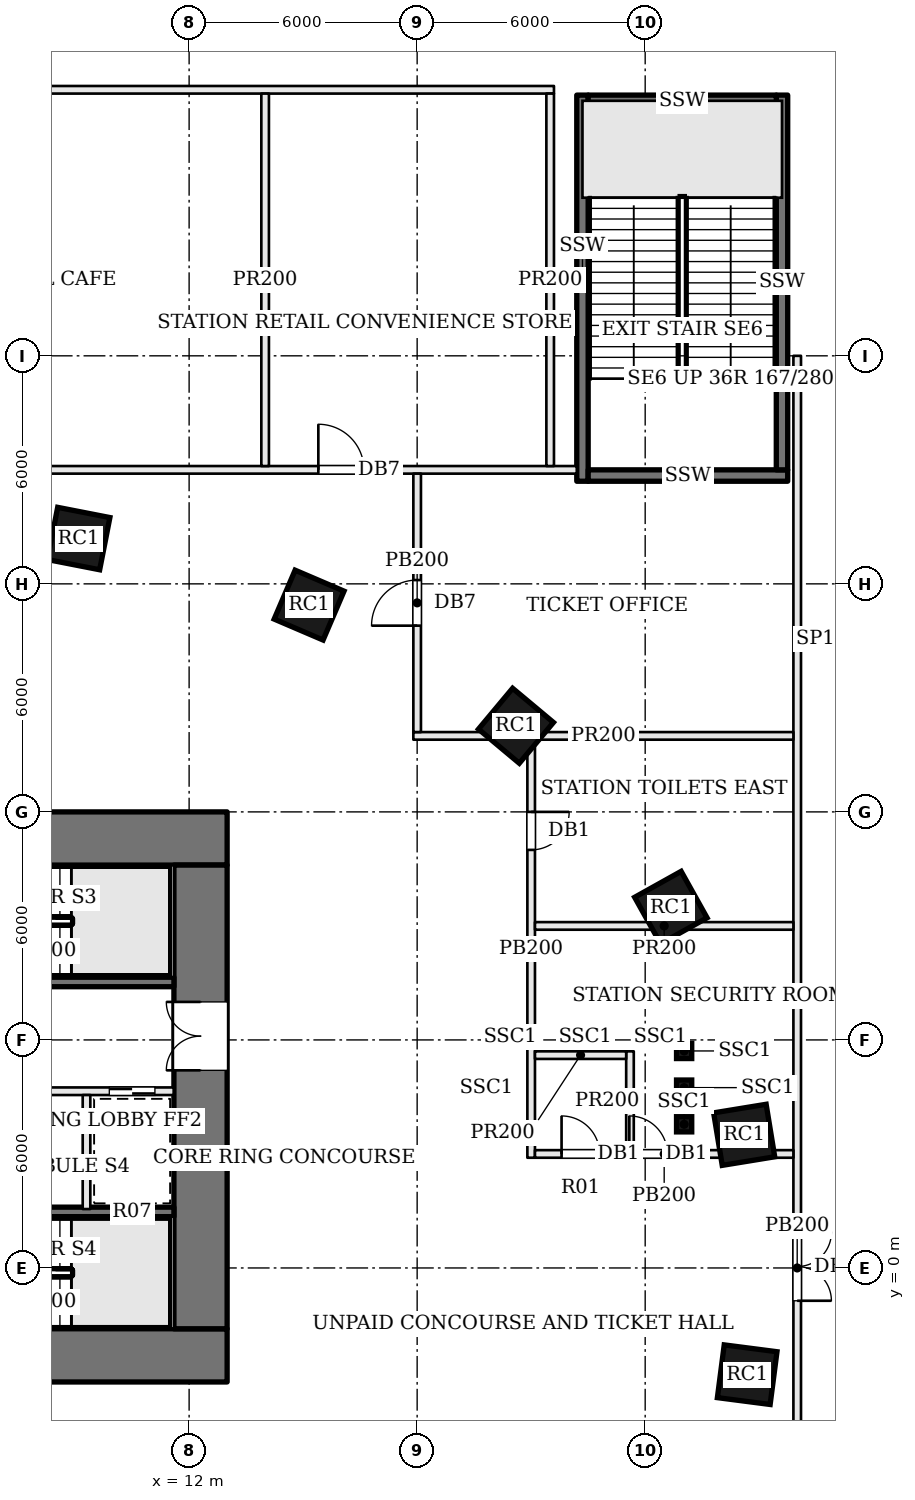
"""IFC4 building model, lengths in metres.
Left out: names, types, materials, properties, quantities, classifications, styles, units other than length and angle.
Written with IfcOpenShell. Run it as: python <this file> out.ifc"""

import sys

from ifc_helpers import new_model, si_unit, direction, frame, frame_2d, origin, origin_2d, place, context, subcontext, project, spatial, rectangle, extrude, element, fill, save


model = new_model("IFC4")
c1 = context("Model", 3, precision=1e-05, world=origin(), true_north=direction((0.0, 1.0)))
c2 = subcontext(c1, "Body", "Model", "MODEL_VIEW")
j1 = project(units=[si_unit("LENGTHUNIT", "METRE"), si_unit("PLANEANGLEUNIT", "RADIAN")], contexts=[c1])
p1 = place(None, origin())
s1 = spatial("IfcSite", under=j1, at=p1, CompositionType="ELEMENT")
p2 = place(p1, origin())
s2 = spatial("IfcBuilding", under=s1, at=p2, CompositionType="ELEMENT")
p3 = place(p2, frame((0.0, 0.0, -6.0)))
s3 = spatial("IfcBuildingStorey", under=s2, at=p3, CompositionType="ELEMENT", Elevation=-6.0)
p4 = place(p3, frame((-13.0, 11.3, 0.0), z_axis=(0.0, 0.0, 1.0), x_axis=(1.0, 0.0, 0.0)))
e1 = element("IfcWall", 1, at=p4, inside=s3, PredefinedType="SHEAR", context=c2, shape_type="SweptSolid", body=[
    extrude(rectangle(XDim=26.0, YDim=1.4, at=frame_2d((13.0, 0.0))), origin(), (0.0, 0.0, 1.0), 6.0),
])
p5 = place(p4, frame((9.375, 0.0, 0.0)))
e2 = element("IfcOpeningElement", 2, at=p5, cuts=e1, PredefinedType="OPENING", context=c2, shape_type="SweptSolid", body=[
    extrude(rectangle(XDim=0.7, YDim=2.1, at=frame_2d((0.35, 1.05))), frame((0.0, 0.71, 0.0), z_axis=(0.0, -1.0, 0.0), x_axis=(1.0, 0.0, 0.0)), (0.0, 0.0, 1.0), 1.42),
])
p6 = place(p4, frame((12.625, 0.0, 0.0)))
e3 = element("IfcOpeningElement", 3, at=p6, cuts=e1, PredefinedType="OPENING", context=c2, shape_type="SweptSolid", body=[
    extrude(rectangle(XDim=0.7, YDim=2.1, at=frame_2d((0.35, 1.05))), frame((0.0, 0.71, 0.0), z_axis=(0.0, -1.0, 0.0), x_axis=(1.0, 0.0, 0.0)), (0.0, 0.0, 1.0), 1.42),
])
p7 = place(p4, frame((14.8, 0.0, 0.0)))
e4 = element("IfcOpeningElement", 4, at=p7, cuts=e1, PredefinedType="OPENING", context=c2, shape_type="SweptSolid", body=[
    extrude(rectangle(XDim=1.0, YDim=2.1, at=frame_2d((0.5, 1.05))), frame((0.0, 0.71, 0.0), z_axis=(0.0, -1.0, 0.0), x_axis=(1.0, 0.0, 0.0)), (0.0, 0.0, 1.0), 1.42),
])
p8 = place(p3, frame((-13.0, -2.3, 0.0), z_axis=(0.0, 0.0, 1.0), x_axis=(1.0, 0.0, 0.0)))
e5 = element("IfcWall", 5, at=p8, inside=s3, PredefinedType="SHEAR", context=c2, shape_type="SweptSolid", body=[
    extrude(rectangle(XDim=26.0, YDim=1.4, at=frame_2d((13.0, 0.0))), origin(), (0.0, 0.0, 1.0), 6.0),
])
p9 = place(p8, frame((9.125, 0.0, 0.0)))
e6 = element("IfcOpeningElement", 6, at=p9, cuts=e5, PredefinedType="OPENING", context=c2, shape_type="SweptSolid", body=[
    extrude(rectangle(XDim=1.2, YDim=2.1, at=frame_2d((0.6, 1.05))), frame((0.0, 0.71, 0.0), z_axis=(0.0, -1.0, 0.0), x_axis=(1.0, 0.0, 0.0)), (0.0, 0.0, 1.0), 1.42),
])
p10 = place(p8, frame((12.625, 0.0, 0.0)))
e7 = element("IfcOpeningElement", 7, at=p10, cuts=e5, PredefinedType="OPENING", context=c2, shape_type="SweptSolid", body=[
    extrude(rectangle(XDim=0.7, YDim=2.1, at=frame_2d((0.35, 1.05))), frame((0.0, 0.71, 0.0), z_axis=(0.0, -1.0, 0.0), x_axis=(1.0, 0.0, 0.0)), (0.0, 0.0, 1.0), 1.42),
])
p11 = place(p8, frame((15.75, 0.0, 0.0)))
e8 = element("IfcOpeningElement", 8, at=p11, cuts=e5, PredefinedType="OPENING", context=c2, shape_type="SweptSolid", body=[
    extrude(rectangle(XDim=1.0, YDim=2.1, at=frame_2d((0.5, 1.05))), frame((0.0, 0.71, 0.0), z_axis=(0.0, -1.0, 0.0), x_axis=(1.0, 0.0, 0.0)), (0.0, 0.0, 1.0), 1.42),
])
p12 = place(p3, frame((12.3, -1.6, 0.0), z_axis=(0.0, 0.0, 1.0), x_axis=(0.0, 1.0, 0.0)))
e9 = element("IfcWall", 9, at=p12, inside=s3, PredefinedType="SHEAR", context=c2, shape_type="SweptSolid", body=[
    extrude(rectangle(XDim=12.2, YDim=1.4, at=frame_2d((6.1, 0.0))), origin(), (0.0, 0.0, 1.0), 6.0),
])
p13 = place(p12, frame((6.8, 0.0, 0.0)))
e10 = element("IfcOpeningElement", 10, at=p13, cuts=e9, PredefinedType="OPENING", context=c2, shape_type="SweptSolid", body=[
    extrude(rectangle(XDim=1.8, YDim=2.1, at=frame_2d((0.9, 1.05))), frame((0.0, 0.71, 0.0), z_axis=(0.0, -1.0, 0.0), x_axis=(1.0, 0.0, 0.0)), (0.0, 0.0, 1.0), 1.42),
])
for number, where, z_axis, x_axis in (
    (11, (26.605, 3.503, 0.0), (0.0, 0.0, 1.0), (-0.161, 0.987, 0.0)),
    (12, (24.676, 9.483, 0.0), (0.0, 0.0, 1.0), (-0.487, 0.873, 0.0)),
    (13, (20.6, 14.266, 0.0), (0.0, 0.0, 1.0), (-0.767, 0.641, 0.0)),
    (14, (15.157, 17.441, 0.0), (0.0, 0.0, 1.0), (-0.919, 0.394, 0.0)),
    (15, (9.094, 19.192, 0.0), (0.0, 0.0, 1.0), (-0.981, 0.192, 0.0)),
    (16, (26.684, -2.808, 0.0), (0.0, 0.0, 1.0), (0.128, 0.992, 0.0)),
):
    element("IfcColumn", number, at=place(p3, frame(where, z_axis=z_axis, x_axis=x_axis)), inside=s3, PredefinedType="COLUMN", context=c2, shape_type="SweptSolid", body=[
        extrude(rectangle(XDim=1.4, YDim=1.4, at=origin_2d()), origin(), (0.0, 0.0, 1.0), 6.0),
    ])
p14 = place(p3, frame((11.6, 7.525, 0.0), z_axis=(0.0, 0.0, 1.0), x_axis=(-1.0, 0.0, 0.0)))
e17 = element("IfcWall", 17, at=p14, inside=s3, PredefinedType="SOLIDWALL", context=c2, shape_type="SweptSolid", body=[
    extrude(rectangle(XDim=6.5, YDim=0.25, at=frame_2d((3.25, 0.0))), origin(), (0.0, 0.0, 1.0), 5.65),
])
p15 = place(p14, frame((5.2, 0.0, 0.0)))
e18 = element("IfcOpeningElement", 18, at=p15, cuts=e17, PredefinedType="OPENING", context=c2, shape_type="SweptSolid", body=[
    extrude(rectangle(XDim=1.2, YDim=2.1, at=frame_2d((0.6, 1.05))), frame((0.0, 0.135, 0.0), z_axis=(0.0, -1.0, 0.0), x_axis=(1.0, 0.0, 0.0)), (0.0, 0.0, 1.0), 0.27),
])
p16 = place(p3, frame((11.6, 4.65, 0.0), z_axis=(0.0, 0.0, 1.0), x_axis=(-1.0, 0.0, 0.0)))
e19 = element("IfcWall", 19, at=p16, inside=s3, PredefinedType="SOLIDWALL", context=c2, shape_type="SweptSolid", body=[
    extrude(rectangle(XDim=6.5, YDim=0.2, at=frame_2d((3.25, 0.0))), origin(), (0.0, 0.0, 1.0), 5.65),
])
p17 = place(p16, frame((3.8, 0.0, 0.0)))
e20 = element("IfcOpeningElement", 20, at=p17, cuts=e19, PredefinedType="OPENING", context=c2, shape_type="SweptSolid", body=[
    extrude(rectangle(XDim=1.2, YDim=2.1, at=frame_2d((0.6, 1.05))), frame((0.0, 0.11, 0.0), z_axis=(0.0, -1.0, 0.0), x_axis=(1.0, 0.0, 0.0)), (0.0, 0.0, 1.0), 0.22),
])
p18 = place(p16, frame((0.5, 0.0, 0.0)))
e21 = element("IfcOpeningElement", 21, at=p18, cuts=e19, PredefinedType="OPENING", context=c2, shape_type="SweptSolid", body=[
    extrude(rectangle(XDim=1.2, YDim=2.1, at=frame_2d((0.6, 1.05))), frame((0.0, 0.11, 0.0), z_axis=(0.0, -1.0, 0.0), x_axis=(1.0, 0.0, 0.0)), (0.0, 0.0, 1.0), 0.22),
])
p19 = place(p3, frame((11.6, 1.475, 0.0), z_axis=(0.0, 0.0, 1.0), x_axis=(-1.0, 0.0, 0.0)))
e22 = element("IfcWall", 22, at=p19, inside=s3, PredefinedType="SOLIDWALL", context=c2, shape_type="SweptSolid", body=[
    extrude(rectangle(XDim=6.5, YDim=0.25, at=frame_2d((3.25, 0.0))), origin(), (0.0, 0.0, 1.0), 5.65),
])
p20 = place(p19, frame((5.2, 0.0, 0.0)))
e23 = element("IfcOpeningElement", 23, at=p20, cuts=e22, PredefinedType="OPENING", context=c2, shape_type="SweptSolid", body=[
    extrude(rectangle(XDim=1.2, YDim=2.1, at=frame_2d((0.6, 1.05))), frame((0.0, 0.135, 0.0), z_axis=(0.0, -1.0, 0.0), x_axis=(1.0, 0.0, 0.0)), (0.0, 0.0, 1.0), 0.27),
])
p21 = place(p3, frame((9.3, 4.55, 0.0), z_axis=(0.0, 0.0, 1.0), x_axis=(0.0, -1.0, 0.0)))
e24 = element("IfcWall", 24, at=p21, inside=s3, PredefinedType="SOLIDWALL", context=c2, shape_type="SweptSolid", body=[
    extrude(rectangle(XDim=3.0, YDim=0.2, at=frame_2d((1.5, 0.0))), origin(), (0.0, 0.0, 1.0), 5.65),
])
p22 = place(p3, frame((28.0, 24.0, 0.0), z_axis=(0.0, 0.0, 1.0), x_axis=(0.0, -1.0, 0.0)))
e25 = element("IfcWall", 25, at=p22, inside=s3, PredefinedType="PARTITIONING", context=c2, shape_type="SweptSolid", body=[
    extrude(rectangle(XDim=48.0, YDim=0.2, at=frame_2d((24.0, 0.0))), origin(), (0.0, 0.0, 1.0), 5.148),
])
p23 = place(p22, frame((23.063, 0.0, 0.0)))
e26 = element("IfcOpeningElement", 26, at=p23, cuts=e25, PredefinedType="OPENING", context=c2, shape_type="SweptSolid", body=[
    extrude(rectangle(XDim=1.8, YDim=2.1, at=frame_2d((0.9, 1.05))), frame((0.0, 0.11, 0.0), z_axis=(0.0, -1.0, 0.0), x_axis=(1.0, 0.0, 0.0)), (0.0, 0.0, 1.0), 0.22),
])
p24 = place(p3, frame((27.9, 14.0, 0.0), z_axis=(0.0, 0.0, 1.0), x_axis=(-1.0, 0.0, 0.0)))
e27 = element("IfcWall", 27, at=p24, inside=s3, PredefinedType="PARTITIONING", context=c2, shape_type="SweptSolid", body=[
    extrude(rectangle(XDim=10.0, YDim=0.2, at=frame_2d((5.0, 0.0))), origin(), (0.0, 0.0, 1.0), 5.134),
])
p25 = place(p3, frame((21.0, 13.9, 0.0), z_axis=(0.0, 0.0, 1.0), x_axis=(0.0, -1.0, 0.0)))
e28 = element("IfcWall", 28, at=p25, inside=s3, PredefinedType="PARTITIONING", context=c2, shape_type="SweptSolid", body=[
    extrude(rectangle(XDim=11.0, YDim=0.2, at=frame_2d((5.5, 0.0))), origin(), (0.0, 0.0, 1.0), 5.148),
])
p26 = place(p25, frame((1.9, 0.0, 0.0)))
e29 = element("IfcOpeningElement", 29, at=p26, cuts=e28, PredefinedType="OPENING", context=c2, shape_type="SweptSolid", body=[
    extrude(rectangle(XDim=1.0, YDim=2.1, at=frame_2d((0.5, 1.05))), frame((0.0, 0.11, 0.0), z_axis=(0.0, -1.0, 0.0), x_axis=(1.0, 0.0, 0.0)), (0.0, 0.0, 1.0), 0.22),
])
p27 = place(p3, frame((21.1, 9.0, 0.0), z_axis=(0.0, 0.0, 1.0), x_axis=(1.0, 0.0, 0.0)))
e30 = element("IfcWall", 30, at=p27, inside=s3, PredefinedType="PARTITIONING", context=c2, shape_type="SweptSolid", body=[
    extrude(rectangle(XDim=6.8, YDim=0.2, at=frame_2d((3.4, 0.0))), origin(), (0.0, 0.0, 1.0), 5.134),
])
p28 = place(p3, frame((-22.2, 21.0, 0.0), z_axis=(0.0, 0.0, 1.0), x_axis=(1.0, 0.0, 0.0)))
e31 = element("IfcWall", 31, at=p28, inside=s3, PredefinedType="PARTITIONING", context=c2, shape_type="SweptSolid", body=[
    extrude(rectangle(XDim=44.4, YDim=0.2, at=frame_2d((22.2, 0.0))), origin(), (0.0, 0.0, 1.0), 5.148),
])
p29 = place(p28, frame((5.6, 0.0, 0.0)))
e32 = element("IfcOpeningElement", 32, at=p29, cuts=e31, PredefinedType="OPENING", context=c2, shape_type="SweptSolid", body=[
    extrude(rectangle(XDim=1.2, YDim=2.1, at=frame_2d((0.6, 1.05))), frame((0.0, 0.11, 0.0), z_axis=(0.0, -1.0, 0.0), x_axis=(1.0, 0.0, 0.0)), (0.0, 0.0, 1.0), 0.22),
])
p30 = place(p28, frame((14.6, 0.0, 0.0)))
e33 = element("IfcOpeningElement", 33, at=p30, cuts=e31, PredefinedType="OPENING", context=c2, shape_type="SweptSolid", body=[
    extrude(rectangle(XDim=1.2, YDim=2.1, at=frame_2d((0.6, 1.05))), frame((0.0, 0.11, 0.0), z_axis=(0.0, -1.0, 0.0), x_axis=(1.0, 0.0, 0.0)), (0.0, 0.0, 1.0), 0.22),
])
p31 = place(p28, frame((28.259, 0.0, 0.0)))
e34 = element("IfcOpeningElement", 34, at=p31, cuts=e31, PredefinedType="OPENING", context=c2, shape_type="SweptSolid", body=[
    extrude(rectangle(XDim=1.2, YDim=2.1, at=frame_2d((0.6, 1.05))), frame((0.0, 0.11, 0.0), z_axis=(0.0, -1.0, 0.0), x_axis=(1.0, 0.0, 0.0)), (0.0, 0.0, 1.0), 0.22),
])
p32 = place(p28, frame((37.6, 0.0, 0.0)))
e35 = element("IfcOpeningElement", 35, at=p32, cuts=e31, PredefinedType="OPENING", context=c2, shape_type="SweptSolid", body=[
    extrude(rectangle(XDim=1.2, YDim=2.1, at=frame_2d((0.6, 1.05))), frame((0.0, 0.11, 0.0), z_axis=(0.0, -1.0, 0.0), x_axis=(1.0, 0.0, 0.0)), (0.0, 0.0, 1.0), 0.22),
])
p33 = place(p3, frame((18.0, 14.1, 0.0), z_axis=(0.0, 0.0, 1.0), x_axis=(0.0, 1.0, 0.0)))
e36 = element("IfcWall", 36, at=p33, inside=s3, PredefinedType="PARTITIONING", context=c2, shape_type="SweptSolid", body=[
    extrude(rectangle(XDim=6.8, YDim=0.2, at=frame_2d((3.4, 0.0))), origin(), (0.0, 0.0, 1.0), 5.148),
])
p34 = place(p33, frame((2.8, 0.0, 0.0)))
e37 = element("IfcOpeningElement", 37, at=p34, cuts=e36, PredefinedType="OPENING", context=c2, shape_type="SweptSolid", body=[
    extrude(rectangle(XDim=1.2, YDim=2.1, at=frame_2d((0.6, 1.05))), frame((0.0, 0.11, 0.0), z_axis=(0.0, -1.0, 0.0), x_axis=(1.0, 0.0, 0.0)), (0.0, 0.0, 1.0), 0.22),
])
p35 = place(p3, frame((22.35, 30.86, 0.0), z_axis=(0.0, 0.0, 1.0), x_axis=(0.0, -1.0, 0.0)))
e38 = element("IfcWall", 38, at=p35, inside=s3, PredefinedType="SOLIDWALL", context=c2, shape_type="SweptSolid", body=[
    extrude(rectangle(XDim=10.16, YDim=0.3, at=frame_2d((5.08, 0.0))), origin(), (0.0, 0.0, 1.0), 5.65),
])
p36 = place(p3, frame((22.5, 20.85, 0.0), z_axis=(0.0, 0.0, 1.0), x_axis=(1.0, 0.0, 0.0)))
e39 = element("IfcWall", 39, at=p36, inside=s3, PredefinedType="SOLIDWALL", context=c2, shape_type="SweptSolid", body=[
    extrude(rectangle(XDim=5.25, YDim=0.3, at=frame_2d((2.625, 0.0))), origin(), (0.0, 0.0, 1.0), 5.65),
])
p37 = place(p3, frame((27.6, 21.0, 0.0), z_axis=(0.0, 0.0, 1.0), x_axis=(0.0, 1.0, 0.0)))
e40 = element("IfcWall", 40, at=p37, inside=s3, PredefinedType="SOLIDWALL", context=c2, shape_type="SweptSolid", body=[
    extrude(rectangle(XDim=9.86, YDim=0.3, at=frame_2d((4.93, 0.0))), origin(), (0.0, 0.0, 1.0), 5.65),
])
p38 = place(p3, frame((23.6, 3.1, 0.0), z_axis=(0.0, 0.0, 1.0), x_axis=(0.0, 1.0, 0.0)))
e41 = element("IfcWall", 41, at=p38, inside=s3, PredefinedType="PARTITIONING", context=c2, shape_type="SweptSolid", body=[
    extrude(rectangle(XDim=2.6, YDim=0.2, at=frame_2d((1.3, 0.0))), origin(), (0.0, 0.0, 1.0), 5.134),
])
p39 = place(p3, frame((23.5, 5.6, 0.0), z_axis=(0.0, 0.0, 1.0), x_axis=(-1.0, 0.0, 0.0)))
e42 = element("IfcWall", 42, at=p39, inside=s3, PredefinedType="PARTITIONING", context=c2, shape_type="SweptSolid", body=[
    extrude(rectangle(XDim=2.4, YDim=0.2, at=frame_2d((1.2, 0.0))), origin(), (0.0, 0.0, 1.0), 5.134),
])
p40 = place(p3, frame((21.1, 3.0, 0.0), z_axis=(0.0, 0.0, 1.0), x_axis=(1.0, 0.0, 0.0)))
e43 = element("IfcWall", 43, at=p40, inside=s3, PredefinedType="PARTITIONING", context=c2, shape_type="SweptSolid", body=[
    extrude(rectangle(XDim=6.8, YDim=0.2, at=frame_2d((3.4, 0.0))), origin(), (0.0, 0.0, 1.0), 5.148),
])
p41 = place(p40, frame((0.7, 0.0, 0.0)))
e44 = element("IfcOpeningElement", 44, at=p41, cuts=e43, PredefinedType="OPENING", context=c2, shape_type="SweptSolid", body=[
    extrude(rectangle(XDim=1.0, YDim=2.1, at=frame_2d((0.5, 1.05))), frame((0.0, 0.11, 0.0), z_axis=(0.0, -1.0, 0.0), x_axis=(1.0, 0.0, 0.0)), (0.0, 0.0, 1.0), 0.22),
])
p42 = place(p40, frame((2.483, 0.0, 0.0)))
e45 = element("IfcOpeningElement", 45, at=p42, cuts=e43, PredefinedType="OPENING", context=c2, shape_type="SweptSolid", body=[
    extrude(rectangle(XDim=1.0, YDim=2.1, at=frame_2d((0.5, 1.05))), frame((0.0, 0.11, 0.0), z_axis=(0.0, -1.0, 0.0), x_axis=(1.0, 0.0, 0.0)), (0.0, 0.0, 1.0), 0.22),
])
p43 = place(p3, frame((22.5, 30.71, 0.0), z_axis=(0.0, 0.0, 1.0), x_axis=(1.0, 0.0, 0.0)))
e46 = element("IfcWall", 46, at=p43, inside=s3, PredefinedType="SOLIDWALL", context=c2, shape_type="SweptSolid", body=[
    extrude(rectangle(XDim=4.95, YDim=0.3, at=frame_2d((2.475, 0.0))), origin(), (0.0, 0.0, 1.0), 5.65),
])
p44 = place(p3, frame((-21.4, 31.0, 0.0), z_axis=(0.0, 0.0, 1.0), x_axis=(1.0, 0.0, 0.0)))
e47 = element("IfcWall", 47, at=p44, inside=s3, PredefinedType="PARTITIONING", context=c2, shape_type="SweptSolid", body=[
    extrude(rectangle(XDim=43.0, YDim=0.2, at=frame_2d((21.5, 0.0))), origin(), (0.0, 0.0, 1.0), 5.134),
])
for number, where, z_axis, x_axis in (
    (48, (14.0, 30.9, 0.0), (0.0, 0.0, 1.0), (0.0, -1.0, 0.0)),
    (49, (21.5, 30.9, 0.0), (0.0, 0.0, 1.0), (0.0, -1.0, 0.0)),
):
    element("IfcWall", number, at=place(p3, frame(where, z_axis=z_axis, x_axis=x_axis)), inside=s3, PredefinedType="PARTITIONING", context=c2, shape_type="SweptSolid", body=[
        extrude(rectangle(XDim=9.8, YDim=0.2, at=frame_2d((4.9, 0.0))), origin(), (0.0, 0.0, 1.0), 5.134),
    ])
for number, where, z_axis, x_axis in (
    (50, (24.4, 6.085, 0.0), (0.0, 0.0, 1.0), (1.0, 0.0, 0.0)),
    (51, (20.45, 6.085, 0.0), (0.0, 0.0, 1.0), (1.0, 0.0, 0.0)),
    (52, (22.425, 6.085, 0.0), (0.0, 0.0, 1.0), (1.0, 0.0, 0.0)),
    (53, (19.825, 4.745, 0.0), (0.0, 0.0, 1.0), (1.0, 0.0, 0.0)),
    (54, (25.025, 3.78, 0.0), (0.0, 0.0, 1.0), (1.0, 0.0, 0.0)),
    (55, (25.025, 5.71, 0.0), (0.0, 0.0, 1.0), (1.0, 0.0, 0.0)),
    (56, (25.025, 4.745, 0.0), (0.0, 0.0, 1.0), (1.0, 0.0, 0.0)),
):
    element("IfcColumn", number, at=place(p3, frame(where, z_axis=z_axis, x_axis=x_axis)), inside=s3, PredefinedType="COLUMN", context=c2, shape_type="SweptSolid", body=[
        extrude(rectangle(XDim=0.4, YDim=0.4, at=origin_2d()), origin(), (0.0, 0.0, 1.0), 5.65),
    ])
p45 = place(p13, origin())
e57 = element("IfcDoor", 57, at=p45, inside=s3, OperationType="DOUBLE_DOOR_SINGLE_SWING", PredefinedType="DOOR", context=c2, shape_type="SweptSolid", body=[
    extrude(rectangle(XDim=1.8, YDim=2.1, at=frame_2d((0.9, 1.05))), frame((0.0, 0.025, 0.0), z_axis=(0.0, -1.0, 0.0), x_axis=(1.0, 0.0, 0.0)), (0.0, 0.0, 1.0), 0.05),
])
fill(e10, e57)
p46 = place(p18, origin())
e58 = element("IfcDoor", 58, at=p46, inside=s3, OperationType="SLIDING_TO_RIGHT", PredefinedType="DOOR", context=c2, shape_type="SweptSolid", body=[
    extrude(rectangle(XDim=1.2, YDim=2.1, at=frame_2d((0.6, 1.05))), frame((0.0, 0.025, 0.0), z_axis=(0.0, -1.0, 0.0), x_axis=(1.0, 0.0, 0.0)), (0.0, 0.0, 1.0), 0.05),
])
fill(e21, e58)
p47 = place(p32, origin())
e59 = element("IfcDoor", 59, at=p47, inside=s3, OperationType="SINGLE_SWING_LEFT", PredefinedType="DOOR", context=c2, shape_type="SweptSolid", body=[
    extrude(rectangle(XDim=1.2, YDim=2.1, at=frame_2d((0.6, 1.05))), frame((0.0, 0.025, 0.0), z_axis=(0.0, -1.0, 0.0), x_axis=(1.0, 0.0, 0.0)), (0.0, 0.0, 1.0), 0.05),
])
fill(e35, e59)
p48 = place(p26, origin())
e60 = element("IfcDoor", 60, at=p48, inside=s3, OperationType="SINGLE_SWING_LEFT", PredefinedType="DOOR", context=c2, shape_type="SweptSolid", body=[
    extrude(rectangle(XDim=1.0, YDim=2.1, at=frame_2d((0.5, 1.05))), frame((0.0, 0.025, 0.0), z_axis=(0.0, -1.0, 0.0), x_axis=(1.0, 0.0, 0.0)), (0.0, 0.0, 1.0), 0.05),
])
fill(e29, e60)
p49 = place(p41, origin())
e61 = element("IfcDoor", 61, at=p49, inside=s3, OperationType="SINGLE_SWING_LEFT", PredefinedType="DOOR", context=c2, shape_type="SweptSolid", body=[
    extrude(rectangle(XDim=1.0, YDim=2.1, at=frame_2d((0.5, 1.05))), frame((0.0, 0.025, 0.0), z_axis=(0.0, -1.0, 0.0), x_axis=(1.0, 0.0, 0.0)), (0.0, 0.0, 1.0), 0.05),
])
fill(e44, e61)
p50 = place(p34, origin())
e62 = element("IfcDoor", 62, at=p50, inside=s3, OperationType="SINGLE_SWING_LEFT", PredefinedType="DOOR", context=c2, shape_type="SweptSolid", body=[
    extrude(rectangle(XDim=1.2, YDim=2.1, at=frame_2d((0.6, 1.05))), frame((0.0, 0.025, 0.0), z_axis=(0.0, -1.0, 0.0), x_axis=(1.0, 0.0, 0.0)), (0.0, 0.0, 1.0), 0.05),
])
fill(e37, e62)
p51 = place(p42, origin())
e63 = element("IfcDoor", 63, at=p51, inside=s3, OperationType="SINGLE_SWING_LEFT", PredefinedType="DOOR", context=c2, shape_type="SweptSolid", body=[
    extrude(rectangle(XDim=1.0, YDim=2.1, at=frame_2d((0.5, 1.05))), frame((0.0, 0.025, 0.0), z_axis=(0.0, -1.0, 0.0), x_axis=(1.0, 0.0, 0.0)), (0.0, 0.0, 1.0), 0.05),
])
fill(e45, e63)
p52 = place(p23, origin())
e64 = element("IfcDoor", 64, at=p52, inside=s3, OperationType="DOUBLE_DOOR_SINGLE_SWING", PredefinedType="DOOR", context=c2, shape_type="SweptSolid", body=[
    extrude(rectangle(XDim=1.8, YDim=2.1, at=frame_2d((0.9, 1.05))), frame((0.0, 0.025, 0.0), z_axis=(0.0, -1.0, 0.0), x_axis=(1.0, 0.0, 0.0)), (0.0, 0.0, 1.0), 0.05),
])
fill(e26, e64)
save(model, sys.argv[1])
